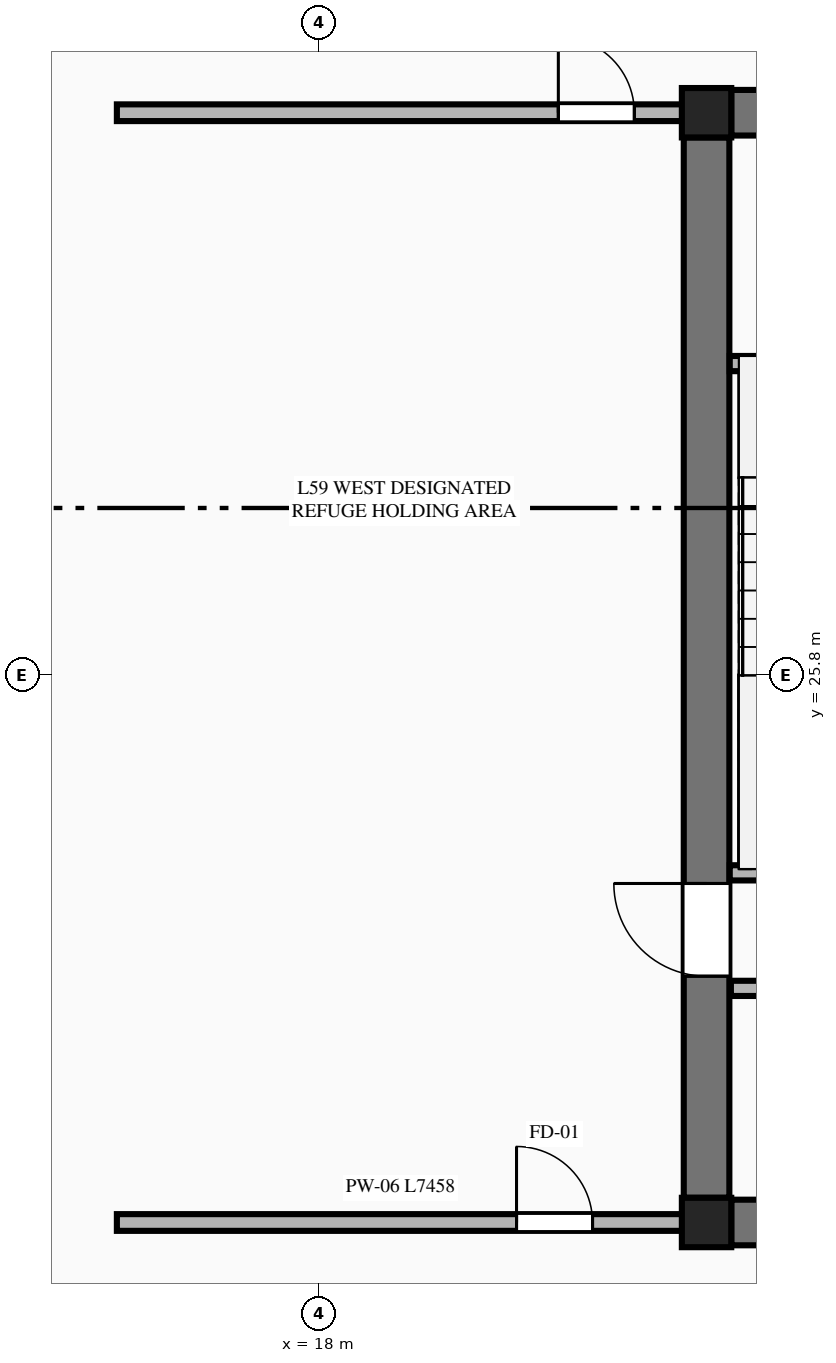
"""IFC4 building model, lengths in metres.
Left out: names, types, materials, properties, quantities, classifications, styles, units other than length and angle.
Written with IfcOpenShell. Run it as: python <this file> out.ifc"""

import sys

from ifc_helpers import new_model, si_unit, direction, frame, frame_2d, origin, origin_2d, place, context, subcontext, project, spatial, rectangle, extrude, element, fill, save


model = new_model("IFC4")
c1 = context("Model", 3, precision=1e-05, world=origin(), true_north=direction((0.0, 1.0)))
c2 = subcontext(c1, "Body", "Model", "MODEL_VIEW")
j1 = project(units=[si_unit("LENGTHUNIT", "METRE"), si_unit("PLANEANGLEUNIT", "RADIAN")], contexts=[c1])
p1 = place(None, origin())
s1 = spatial("IfcSite", under=j1, at=p1, CompositionType="ELEMENT")
p2 = place(p1, origin())
s2 = spatial("IfcBuilding", under=s1, at=p2, CompositionType="ELEMENT")
p3 = place(p2, frame((0.0, 0.0, 221.6)))
s3 = spatial("IfcBuildingStorey", under=s2, at=p3, CompositionType="ELEMENT", Elevation=221.6)
for number, where, z_axis, x_axis in (
    (1, (23.1, 18.6, 0.0), (0.0, 0.0, 1.0), (1.0, 0.0, 0.0)),
    (2, (23.1, 33.2, 0.0), (0.0, 0.0, 1.0), (1.0, 0.0, 0.0)),
):
    element("IfcColumn", number, at=place(p3, frame(where, z_axis=z_axis, x_axis=x_axis)), inside=s3, PredefinedType="COLUMN", context=c2, shape_type="SweptSolid", body=[
        extrude(rectangle(XDim=0.65, YDim=0.65, at=origin_2d()), origin(), (0.0, 0.0, 1.0), 5.4),
    ])
for number, where, z_axis, x_axis in (
    (3, (23.425, 18.6, 0.0), (0.0, 0.0, 1.0), (1.0, 0.0, 0.0)),
    (4, (23.425, 33.2, 0.0), (0.0, 0.0, 1.0), (1.0, 0.0, 0.0)),
):
    element("IfcWall", number, at=place(p3, frame(where, z_axis=z_axis, x_axis=x_axis)), inside=s3, PredefinedType="SHEAR", context=c2, shape_type="SweptSolid", body=[
        extrude(rectangle(XDim=17.95, YDim=0.6, at=frame_2d((8.975, 0.0))), origin(), (0.0, 0.0, 1.0), 5.2),
    ])
p4 = place(p3, frame((23.1, 18.925, 0.0), z_axis=(0.0, 0.0, 1.0), x_axis=(0.0, 1.0, 0.0)))
e5 = element("IfcWall", 5, at=p4, inside=s3, PredefinedType="SHEAR", context=c2, shape_type="SweptSolid", body=[
    extrude(rectangle(XDim=13.95, YDim=0.6, at=frame_2d((6.975, 0.0))), origin(), (0.0, 0.0, 1.0), 5.2),
])
p5 = place(p4, frame((2.915, 0.0, 0.0)))
e6 = element("IfcOpeningElement", 6, at=p5, cuts=e5, PredefinedType="OPENING", context=c2, shape_type="SweptSolid", body=[
    extrude(rectangle(XDim=1.22, YDim=2.25, at=frame_2d((0.61, 1.125))), frame((0.0, 0.31, 0.0), z_axis=(0.0, -1.0, 0.0), x_axis=(1.0, 0.0, 0.0)), (0.0, 0.0, 1.0), 0.62),
])
p6 = place(p3, frame((23.405, 23.2, 0.0), z_axis=(0.0, 0.0, 1.0), x_axis=(1.0, 0.0, 0.0)))
e7 = element("IfcWall", 7, at=p6, inside=s3, PredefinedType="PLUMBINGWALL", context=c2, shape_type="SweptSolid", body=[
    extrude(rectangle(XDim=3.27, YDim=0.2, at=frame_2d((1.635, 0.0))), origin(), (0.0, 0.0, 1.0), 5.2),
])
p7 = place(p3, frame((23.405, 29.9, 0.0), z_axis=(0.0, 0.0, 1.0), x_axis=(1.0, 0.0, 0.0)))
e8 = element("IfcWall", 8, at=p7, inside=s3, PredefinedType="PLUMBINGWALL", context=c2, shape_type="SweptSolid", body=[
    extrude(rectangle(XDim=3.27, YDim=0.2, at=frame_2d((1.635, 0.0))), origin(), (0.0, 0.0, 1.0), 5.2),
])
p8 = place(p7, frame((1.85, 0.0, 0.0)))
e9 = element("IfcOpeningElement", 9, at=p8, cuts=e8, PredefinedType="OPENING", context=c2, shape_type="SweptSolid", body=[
    extrude(rectangle(XDim=0.85, YDim=2.05, at=frame_2d((0.425, 1.025))), frame((0.0, 0.11, 0.0), z_axis=(0.0, -1.0, 0.0), x_axis=(1.0, 0.0, 0.0)), (0.0, 0.0, 1.0), 0.22),
])
p9 = place(p3, frame((23.42, 21.68, 0.0), z_axis=(0.0, 0.0, 1.0), x_axis=(1.0, 0.0, 0.0)))
e10 = element("IfcWall", 10, at=p9, inside=s3, PredefinedType="PLUMBINGWALL", context=c2, shape_type="SweptSolid", body=[
    extrude(rectangle(XDim=17.96, YDim=0.2, at=frame_2d((8.98, 0.0))), origin(), (0.0, 0.0, 1.0), 5.2),
])
p10 = place(p9, frame((0.46, 0.0, 0.0)))
e11 = element("IfcOpeningElement", 11, at=p10, cuts=e10, PredefinedType="OPENING", context=c2, shape_type="SweptSolid", body=[
    extrude(rectangle(XDim=0.92, YDim=2.15, at=frame_2d((0.46, 1.075))), frame((0.0, 0.11, 0.0), z_axis=(0.0, -1.0, 0.0), x_axis=(1.0, 0.0, 0.0)), (0.0, 0.0, 1.0), 0.22),
])
p11 = place(p9, frame((4.78, 0.0, 0.0)))
e12 = element("IfcOpeningElement", 12, at=p11, cuts=e10, PredefinedType="OPENING", context=c2, shape_type="SweptSolid", body=[
    extrude(rectangle(XDim=0.92, YDim=2.15, at=frame_2d((0.46, 1.075))), frame((0.0, 0.11, 0.0), z_axis=(0.0, -1.0, 0.0), x_axis=(1.0, 0.0, 0.0)), (0.0, 0.0, 1.0), 0.22),
])
p12 = place(p9, frame((9.48, 0.0, 0.0)))
e13 = element("IfcOpeningElement", 13, at=p12, cuts=e10, PredefinedType="OPENING", context=c2, shape_type="SweptSolid", body=[
    extrude(rectangle(XDim=0.92, YDim=2.15, at=frame_2d((0.46, 1.075))), frame((0.0, 0.11, 0.0), z_axis=(0.0, -1.0, 0.0), x_axis=(1.0, 0.0, 0.0)), (0.0, 0.0, 1.0), 0.22),
])
p13 = place(p9, frame((14.08, 0.0, 0.0)))
e14 = element("IfcOpeningElement", 14, at=p13, cuts=e10, PredefinedType="OPENING", context=c2, shape_type="SweptSolid", body=[
    extrude(rectangle(XDim=0.92, YDim=2.15, at=frame_2d((0.46, 1.075))), frame((0.0, 0.11, 0.0), z_axis=(0.0, -1.0, 0.0), x_axis=(1.0, 0.0, 0.0)), (0.0, 0.0, 1.0), 0.22),
])
p14 = place(p3, frame((15.342, 18.6, 0.0), z_axis=(0.0, 0.0, 1.0), x_axis=(1.0, 0.0, 0.0)))
e15 = element("IfcWall", 15, at=p14, inside=s3, PredefinedType="PARTITIONING", context=c2, shape_type="SweptSolid", body=[
    extrude(rectangle(XDim=7.458, YDim=0.22, at=frame_2d((3.729, 0.0))), origin(), (0.0, 0.0, 1.0), 3.79),
])
p15 = place(p14, frame((5.258, 0.0, 0.0)))
e16 = element("IfcOpeningElement", 16, at=p15, cuts=e15, PredefinedType="OPENING", context=c2, shape_type="SweptSolid", body=[
    extrude(rectangle(XDim=1.0, YDim=2.15, at=frame_2d((0.5, 1.075))), frame((0.0, 0.12, 0.0), z_axis=(0.0, -1.0, 0.0), x_axis=(1.0, 0.0, 0.0)), (0.0, 0.0, 1.0), 0.24),
])
p16 = place(p3, frame((15.342, 33.2, 0.0), z_axis=(0.0, 0.0, 1.0), x_axis=(1.0, 0.0, 0.0)))
e17 = element("IfcWall", 17, at=p16, inside=s3, PredefinedType="PARTITIONING", context=c2, shape_type="SweptSolid", body=[
    extrude(rectangle(XDim=7.458, YDim=0.22, at=frame_2d((3.729, 0.0))), origin(), (0.0, 0.0, 1.0), 5.2),
])
p17 = place(p16, frame((5.808, 0.0, 0.0)))
e18 = element("IfcOpeningElement", 18, at=p17, cuts=e17, PredefinedType="OPENING", context=c2, shape_type="SweptSolid", body=[
    extrude(rectangle(XDim=1.0, YDim=2.15, at=frame_2d((0.5, 1.075))), frame((0.0, 0.12, 0.0), z_axis=(0.0, -1.0, 0.0), x_axis=(1.0, 0.0, 0.0)), (0.0, 0.0, 1.0), 0.24),
])
for number, where, z_axis, x_axis in (
    (19, (15.397, 38.173, 0.0), (0.0, 0.0, 1.0), (-0.451, -0.892, 0.0)),
    (20, (13.1, 17.969, 0.0), (0.0, 0.0, 1.0), (0.451, -0.892, 0.0)),
):
    element("IfcWall", number, at=place(p3, frame(where, z_axis=z_axis, x_axis=x_axis)), inside=s3, PredefinedType="STANDARD", context=c2, shape_type="SweptSolid", body=[
        extrude(rectangle(XDim=5.09, YDim=0.36, at=frame_2d((2.545, 0.0))), origin(), (0.0, 0.0, 1.0), 3.79),
    ])
p18 = place(p5, origin())
e21 = element("IfcDoor", 21, at=p18, inside=s3, OperationType="SINGLE_SWING_RIGHT", PredefinedType="DOOR", context=c2, shape_type="SweptSolid", body=[
    extrude(rectangle(XDim=1.22, YDim=2.25, at=frame_2d((0.61, 1.125))), frame((0.0, 0.025, 0.0), z_axis=(0.0, -1.0, 0.0), x_axis=(1.0, 0.0, 0.0)), (0.0, 0.0, 1.0), 0.05),
])
fill(e6, e21)
p19 = place(p15, origin())
e22 = element("IfcDoor", 22, at=p19, inside=s3, OperationType="SINGLE_SWING_LEFT", PredefinedType="DOOR", context=c2, shape_type="SweptSolid", body=[
    extrude(rectangle(XDim=1.0, YDim=2.15, at=frame_2d((0.5, 1.075))), frame((0.0, 0.025, 0.0), z_axis=(0.0, -1.0, 0.0), x_axis=(1.0, 0.0, 0.0)), (0.0, 0.0, 1.0), 0.05),
])
fill(e16, e22)
p20 = place(p17, origin())
e23 = element("IfcDoor", 23, at=p20, inside=s3, OperationType="SINGLE_SWING_LEFT", PredefinedType="DOOR", context=c2, shape_type="SweptSolid", body=[
    extrude(rectangle(XDim=1.0, YDim=2.15, at=frame_2d((0.5, 1.075))), frame((0.0, 0.025, 0.0), z_axis=(0.0, -1.0, 0.0), x_axis=(1.0, 0.0, 0.0)), (0.0, 0.0, 1.0), 0.05),
])
fill(e18, e23)
save(model, sys.argv[1])
